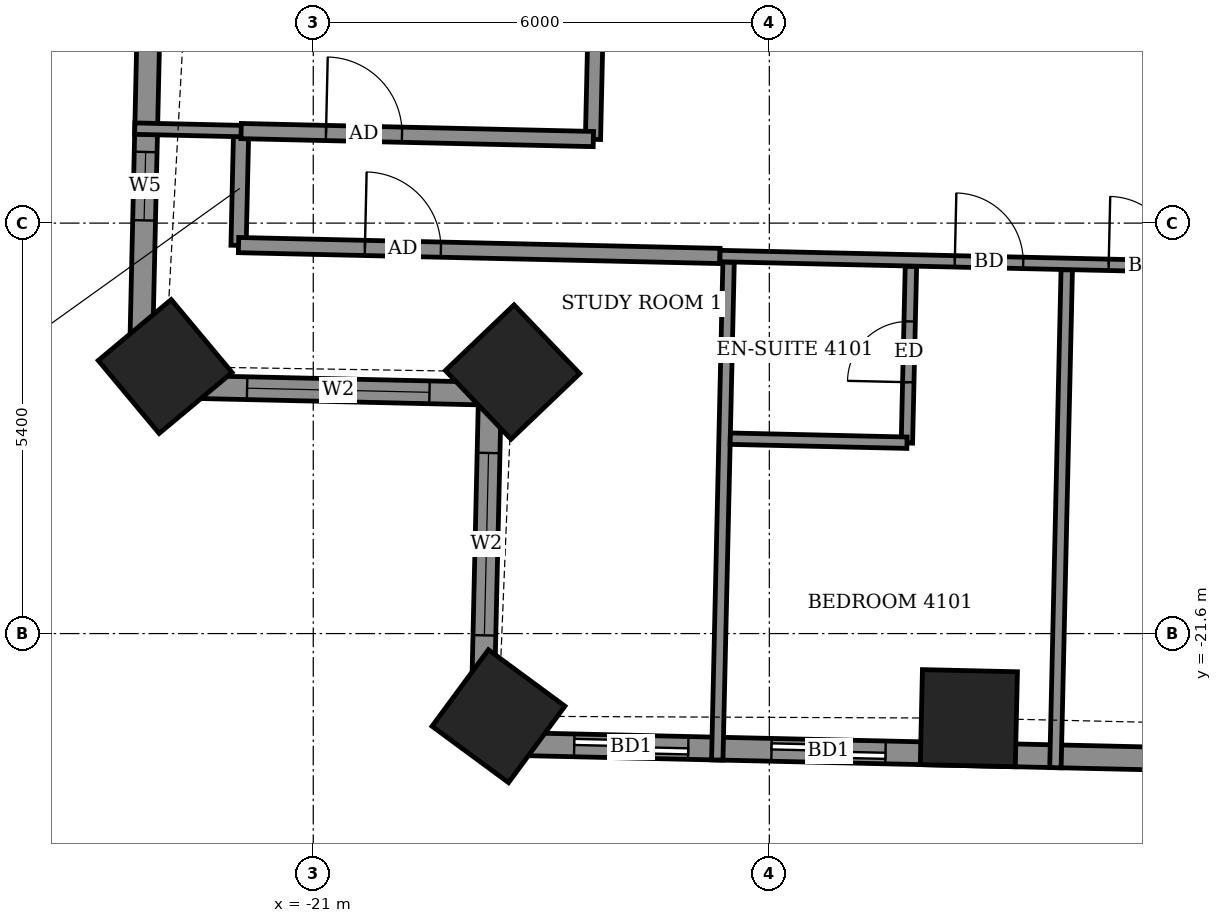
"""IFC4 building model, lengths in metres.
Left out: names, types, materials, properties, quantities, classifications, styles, units other than length and angle.
Written with IfcOpenShell. Run it as: python <this file> out.ifc"""

import sys

from ifc_helpers import new_model, si_unit, direction, frame, frame_2d, origin, origin_2d, place, context, subcontext, project, spatial, rectangle, extrude, element, fill, save


model = new_model("IFC4")
c1 = context("Model", 3, precision=1e-05, world=origin(), true_north=direction((0.0, 1.0)))
c2 = subcontext(c1, "Body", "Model", "MODEL_VIEW")
j1 = project(units=[si_unit("LENGTHUNIT", "METRE"), si_unit("PLANEANGLEUNIT", "RADIAN")], contexts=[c1])
p1 = place(None, origin())
s1 = spatial("IfcSite", under=j1, at=p1, CompositionType="ELEMENT")
p2 = place(p1, origin())
s2 = spatial("IfcBuilding", under=s1, at=p2, CompositionType="ELEMENT")
p3 = place(p2, frame((0.0, 0.0, 163.5)))
s3 = spatial("IfcBuildingStorey", under=s2, at=p3, CompositionType="ELEMENT", Elevation=163.5)
for number, where, z_axis, x_axis in (
    (1, (-22.948, -18.086, -0.55), (0.0, 0.0, 1.0), (0.641, -0.768, 0.0)),
    (2, (-18.378, -18.159, -0.55), (0.0, 0.0, 1.0), (0.691, -0.723, 0.0)),
    (3, (-18.563, -22.687, -0.55), (0.0, 0.0, 1.0), (0.805, -0.593, 0.0)),
    (4, (-12.375, -22.713, -0.55), (0.0, 0.0, 1.0), (1.0, -0.023, 0.0)),
):
    element("IfcColumn", number, at=place(p3, frame(where, z_axis=z_axis, x_axis=x_axis)), inside=s3, PredefinedType="COLUMN", context=c2, shape_type="SweptSolid", body=[
        extrude(rectangle(XDim=1.25, YDim=1.25, at=origin_2d()), origin(), (0.0, 0.0, 1.0), 3.6),
    ])
p4 = place(p3, frame((-23.038, -7.913, 0.0), z_axis=(0.0, 0.0, 1.0), x_axis=(-0.022705985163, -0.999742185885, 0.0)))
e5 = element("IfcWall", 5, at=p4, inside=s3, PredefinedType="SOLIDWALL", context=c2, shape_type="SweptSolid", body=[
    extrude(rectangle(XDim=10.43, YDim=0.3, at=frame_2d((5.215, 0.0))), origin(), (0.0, 0.0, 1.0), 3.05),
])
p5 = place(p4, frame((1.041, 0.0, 0.0)))
e6 = element("IfcOpeningElement", 6, at=p5, cuts=e5, PredefinedType="OPENING", context=c2, shape_type="SweptSolid", body=[
    extrude(rectangle(XDim=1.5, YDim=2.4, at=frame_2d((0.75, 1.2))), frame((0.0, 0.16, 0.0), z_axis=(0.0, -1.0, 0.0), x_axis=(1.0, 0.0, 0.0)), (0.0, 0.0, 1.0), 0.32),
])
p6 = place(p4, frame((3.573, 0.0, 0.9)))
e7 = element("IfcOpeningElement", 7, at=p6, cuts=e5, PredefinedType="OPENING", context=c2, shape_type="SweptSolid", body=[
    extrude(rectangle(XDim=0.9, YDim=1.5, at=frame_2d((0.45, 0.75))), frame((0.0, 0.16, 0.0), z_axis=(0.0, -1.0, 0.0), x_axis=(1.0, 0.0, 0.0)), (0.0, 0.0, 1.0), 0.32),
])
p7 = place(p4, frame((7.353, 0.0, 0.9)))
e8 = element("IfcOpeningElement", 8, at=p7, cuts=e5, PredefinedType="OPENING", context=c2, shape_type="SweptSolid", body=[
    extrude(rectangle(XDim=0.9, YDim=1.5, at=frame_2d((0.45, 0.75))), frame((0.0, 0.16, 0.0), z_axis=(0.0, -1.0, 0.0), x_axis=(1.0, 0.0, 0.0)), (0.0, 0.0, 1.0), 0.32),
])
p8 = place(p3, frame((-23.275, -18.34, 0.0), z_axis=(0.0, 0.0, 1.0), x_axis=(0.999744377441, -0.022609285172, 0.0)))
e9 = element("IfcWall", 9, at=p8, inside=s3, PredefinedType="SOLIDWALL", context=c2, shape_type="SweptSolid", body=[
    extrude(rectangle(XDim=4.6, YDim=0.3, at=frame_2d((2.3, 0.0))), origin(), (0.0, 0.0, 1.0), 2.55),
])
p9 = place(p8, frame((1.405, 0.0, 0.9)))
e10 = element("IfcOpeningElement", 10, at=p9, cuts=e9, PredefinedType="OPENING", context=c2, shape_type="SweptSolid", body=[
    extrude(rectangle(XDim=2.4, YDim=1.5, at=frame_2d((1.2, 0.75))), frame((0.0, 0.16, 0.0), z_axis=(0.0, -1.0, 0.0), x_axis=(1.0, 0.0, 0.0)), (0.0, 0.0, 1.0), 0.32),
])
p10 = place(p3, frame((-18.676, -18.444, 0.0), z_axis=(0.0, 0.0, 1.0), x_axis=(-0.022821468877, -0.999739556364, 0.0)))
e11 = element("IfcWall", 11, at=p10, inside=s3, PredefinedType="SOLIDWALL", context=c2, shape_type="SweptSolid", body=[
    extrude(rectangle(XDim=4.6, YDim=0.3, at=frame_2d((2.3, 0.0))), origin(), (0.0, 0.0, 1.0), 2.55),
])
p11 = place(p10, frame((0.78, 0.0, 0.9)))
e12 = element("IfcOpeningElement", 12, at=p11, cuts=e11, PredefinedType="OPENING", context=c2, shape_type="SweptSolid", body=[
    extrude(rectangle(XDim=2.4, YDim=1.5, at=frame_2d((1.2, 0.75))), frame((0.0, 0.16, 0.0), z_axis=(0.0, -1.0, 0.0), x_axis=(1.0, 0.0, 0.0)), (0.0, 0.0, 1.0), 0.32),
])
p12 = place(p3, frame((-18.781, -23.043, 0.0), z_axis=(0.0, 0.0, 1.0), x_axis=(0.999742794992, -0.022679150367, 0.0)))
e13 = element("IfcWall", 13, at=p12, inside=s3, PredefinedType="SOLIDWALL", context=c2, shape_type="SweptSolid", body=[
    extrude(rectangle(XDim=38.98, YDim=0.3, at=frame_2d((19.49, 0.0))), origin(), (0.0, 0.0, 1.0), 3.05),
])
p13 = place(p12, frame((1.215, 0.0, 0.0)))
e14 = element("IfcOpeningElement", 14, at=p13, cuts=e13, PredefinedType="OPENING", context=c2, shape_type="SweptSolid", body=[
    extrude(rectangle(XDim=1.5, YDim=2.4, at=frame_2d((0.75, 1.2))), frame((0.0, 0.16, 0.0), z_axis=(0.0, -1.0, 0.0), x_axis=(1.0, 0.0, 0.0)), (0.0, 0.0, 1.0), 0.32),
])
p14 = place(p12, frame((3.811, 0.0, 0.0)))
e15 = element("IfcOpeningElement", 15, at=p14, cuts=e13, PredefinedType="OPENING", context=c2, shape_type="SweptSolid", body=[
    extrude(rectangle(XDim=1.5, YDim=2.4, at=frame_2d((0.75, 1.2))), frame((0.0, 0.16, 0.0), z_axis=(0.0, -1.0, 0.0), x_axis=(1.0, 0.0, 0.0)), (0.0, 0.0, 1.0), 0.32),
])
p15 = place(p12, frame((9.0, 0.0, 0.0)))
e16 = element("IfcOpeningElement", 16, at=p15, cuts=e13, PredefinedType="OPENING", context=c2, shape_type="SweptSolid", body=[
    extrude(rectangle(XDim=1.5, YDim=2.4, at=frame_2d((0.75, 1.2))), frame((0.0, 0.16, 0.0), z_axis=(0.0, -1.0, 0.0), x_axis=(1.0, 0.0, 0.0)), (0.0, 0.0, 1.0), 0.32),
])
p16 = place(p12, frame((14.109, 0.0, 0.0)))
e17 = element("IfcOpeningElement", 17, at=p16, cuts=e13, PredefinedType="OPENING", context=c2, shape_type="SweptSolid", body=[
    extrude(rectangle(XDim=1.5, YDim=2.4, at=frame_2d((0.75, 1.2))), frame((0.0, 0.16, 0.0), z_axis=(0.0, -1.0, 0.0), x_axis=(1.0, 0.0, 0.0)), (0.0, 0.0, 1.0), 0.32),
])
p17 = place(p12, frame((17.008, 0.0, 0.0)))
e18 = element("IfcOpeningElement", 18, at=p17, cuts=e13, PredefinedType="OPENING", context=c2, shape_type="SweptSolid", body=[
    extrude(rectangle(XDim=1.5, YDim=2.4, at=frame_2d((0.75, 1.2))), frame((0.0, 0.16, 0.0), z_axis=(0.0, -1.0, 0.0), x_axis=(1.0, 0.0, 0.0)), (0.0, 0.0, 1.0), 0.32),
])
p18 = place(p12, frame((22.225, 0.0, 0.0)))
e19 = element("IfcOpeningElement", 19, at=p18, cuts=e13, PredefinedType="OPENING", context=c2, shape_type="SweptSolid", body=[
    extrude(rectangle(XDim=1.5, YDim=2.4, at=frame_2d((0.75, 1.2))), frame((0.0, 0.16, 0.0), z_axis=(0.0, -1.0, 0.0), x_axis=(1.0, 0.0, 0.0)), (0.0, 0.0, 1.0), 0.32),
])
p19 = place(p12, frame((27.181, 0.0, 0.0)))
e20 = element("IfcOpeningElement", 20, at=p19, cuts=e13, PredefinedType="OPENING", context=c2, shape_type="SweptSolid", body=[
    extrude(rectangle(XDim=1.5, YDim=2.4, at=frame_2d((0.75, 1.2))), frame((0.0, 0.16, 0.0), z_axis=(0.0, -1.0, 0.0), x_axis=(1.0, 0.0, 0.0)), (0.0, 0.0, 1.0), 0.32),
])
p20 = place(p12, frame((30.079, 0.0, 0.0)))
e21 = element("IfcOpeningElement", 21, at=p20, cuts=e13, PredefinedType="OPENING", context=c2, shape_type="SweptSolid", body=[
    extrude(rectangle(XDim=1.5, YDim=2.4, at=frame_2d((0.75, 1.2))), frame((0.0, 0.16, 0.0), z_axis=(0.0, -1.0, 0.0), x_axis=(1.0, 0.0, 0.0)), (0.0, 0.0, 1.0), 0.32),
])
p21 = place(p12, frame((34.751, 0.0, 0.9)))
e22 = element("IfcOpeningElement", 22, at=p21, cuts=e13, PredefinedType="OPENING", context=c2, shape_type="SweptSolid", body=[
    extrude(rectangle(XDim=2.4, YDim=1.5, at=frame_2d((1.2, 0.75))), frame((0.0, 0.16, 0.0), z_axis=(0.0, -1.0, 0.0), x_axis=(1.0, 0.0, 0.0)), (0.0, 0.0, 1.0), 0.32),
])
p22 = place(p3, frame((-15.685, -23.263, 0.0), z_axis=(0.0, 0.0, 1.0), x_axis=(0.022772202332, 0.999740679777, 0.0)))
e23 = element("IfcWall", 23, at=p22, inside=s3, PredefinedType="PARTITIONING", context=c2, shape_type="SweptSolid", body=[
    extrude(rectangle(XDim=6.551, YDim=0.15, at=frame_2d((3.275, 0.0))), origin(), (0.0, 0.0, 1.0), 2.55),
])
p23 = place(p3, frame((-11.236, -23.364, 0.0), z_axis=(0.0, 0.0, 1.0), x_axis=(0.022771353855, 0.999740699103, 0.0)))
e24 = element("IfcWall", 24, at=p23, inside=s3, PredefinedType="PARTITIONING", context=c2, shape_type="SweptSolid", body=[
    extrude(rectangle(XDim=6.551, YDim=0.15, at=frame_2d((3.275, 0.0))), origin(), (0.0, 0.0, 1.0), 2.55),
])
p24 = place(p3, frame((-13.19, -19.093, 0.0), z_axis=(0.0, 0.0, 1.0), x_axis=(0.02279059109, 0.999740260747, 0.0)))
e25 = element("IfcWall", 25, at=p24, inside=s3, PredefinedType="PARTITIONING", context=c2, shape_type="SweptSolid", body=[
    extrude(rectangle(XDim=2.324, YDim=0.15, at=frame_2d((1.162, 0.0))), origin(), (0.0, 0.0, 1.0), 3.05),
])
p25 = place(p24, frame((0.8, 0.0, 0.0)))
e26 = element("IfcOpeningElement", 26, at=p25, cuts=e25, PredefinedType="OPENING", context=c2, shape_type="SweptSolid", body=[
    extrude(rectangle(XDim=0.8, YDim=2.1, at=frame_2d((0.4, 1.05))), frame((0.0, 0.085, 0.0), z_axis=(0.0, -1.0, 0.0), x_axis=(1.0, 0.0, 0.0)), (0.0, 0.0, 1.0), 0.17),
])
p26 = place(p3, frame((-15.514, -19.036, 0.0), z_axis=(0.0, 0.0, 1.0), x_axis=(0.999738082346, -0.022885950011, 0.0)))
e27 = element("IfcWall", 27, at=p26, inside=s3, PredefinedType="PARTITIONING", context=c2, shape_type="SweptSolid", body=[
    extrude(rectangle(XDim=2.325, YDim=0.15, at=frame_2d((1.163, 0.0))), origin(), (0.0, 0.0, 1.0), 3.05),
])
p27 = place(p3, frame((-21.983, -16.493, 0.0), z_axis=(0.0, 0.0, 1.0), x_axis=(0.022617910375, 0.999744182344, 0.0)))
e28 = element("IfcWall", 28, at=p27, inside=s3, PredefinedType="PARTITIONING", context=c2, shape_type="SweptSolid", body=[
    extrude(rectangle(XDim=1.5, YDim=0.2, at=frame_2d((0.75, 0.0))), origin(), (0.0, 0.0, 1.0), 3.05),
])
p28 = place(p3, frame((-21.983, -16.489, 0.0), z_axis=(0.0, 0.0, 1.0), x_axis=(0.999744930163, -0.022584831499, 0.0)))
e29 = element("IfcWall", 29, at=p28, inside=s3, PredefinedType="PARTITIONING", context=c2, shape_type="SweptSolid", body=[
    extrude(rectangle(XDim=6.335, YDim=0.2, at=frame_2d((3.167, 0.0))), origin(), (0.0, 0.0, 1.0), 3.05),
])
p29 = place(p28, frame((1.663, 0.0, 0.0)))
e30 = element("IfcOpeningElement", 30, at=p29, cuts=e29, PredefinedType="OPENING", context=c2, shape_type="SweptSolid", body=[
    extrude(rectangle(XDim=1.0, YDim=2.1, at=frame_2d((0.5, 1.05))), frame((0.0, 0.11, 0.0), z_axis=(0.0, -1.0, 0.0), x_axis=(1.0, 0.0, 0.0)), (0.0, 0.0, 1.0), 0.22),
])
p30 = place(p3, frame((-15.649, -16.633, 0.0), z_axis=(0.0, 0.0, 1.0), x_axis=(0.999743261737, -0.022658565952, 0.0)))
e31 = element("IfcWall", 31, at=p30, inside=s3, PredefinedType="PARTITIONING", context=c2, shape_type="SweptSolid", body=[
    extrude(rectangle(XDim=30.536, YDim=0.15, at=frame_2d((15.268, 0.0))), origin(), (0.0, 0.0, 1.0), 3.05),
])
p31 = place(p30, frame((3.09, 0.0, 0.0)))
e32 = element("IfcOpeningElement", 32, at=p31, cuts=e31, PredefinedType="OPENING", context=c2, shape_type="SweptSolid", body=[
    extrude(rectangle(XDim=0.9, YDim=2.1, at=frame_2d((0.45, 1.05))), frame((0.0, 0.085, 0.0), z_axis=(0.0, -1.0, 0.0), x_axis=(1.0, 0.0, 0.0)), (0.0, 0.0, 1.0), 0.17),
])
p32 = place(p30, frame((5.115, 0.0, 0.0)))
e33 = element("IfcOpeningElement", 33, at=p32, cuts=e31, PredefinedType="OPENING", context=c2, shape_type="SweptSolid", body=[
    extrude(rectangle(XDim=0.9, YDim=2.1, at=frame_2d((0.45, 1.05))), frame((0.0, 0.085, 0.0), z_axis=(0.0, -1.0, 0.0), x_axis=(1.0, 0.0, 0.0)), (0.0, 0.0, 1.0), 0.17),
])
p33 = place(p30, frame((11.94, 0.0, 0.0)))
e34 = element("IfcOpeningElement", 34, at=p33, cuts=e31, PredefinedType="OPENING", context=c2, shape_type="SweptSolid", body=[
    extrude(rectangle(XDim=0.9, YDim=2.1, at=frame_2d((0.45, 1.05))), frame((0.0, 0.085, 0.0), z_axis=(0.0, -1.0, 0.0), x_axis=(1.0, 0.0, 0.0)), (0.0, 0.0, 1.0), 0.17),
])
p34 = place(p30, frame((13.965, 0.0, 0.0)))
e35 = element("IfcOpeningElement", 35, at=p34, cuts=e31, PredefinedType="OPENING", context=c2, shape_type="SweptSolid", body=[
    extrude(rectangle(XDim=0.9, YDim=2.1, at=frame_2d((0.45, 1.05))), frame((0.0, 0.085, 0.0), z_axis=(0.0, -1.0, 0.0), x_axis=(1.0, 0.0, 0.0)), (0.0, 0.0, 1.0), 0.17),
])
p35 = place(p30, frame((20.74, 0.0, 0.0)))
e36 = element("IfcOpeningElement", 36, at=p35, cuts=e31, PredefinedType="OPENING", context=c2, shape_type="SweptSolid", body=[
    extrude(rectangle(XDim=0.9, YDim=2.1, at=frame_2d((0.45, 1.05))), frame((0.0, 0.085, 0.0), z_axis=(0.0, -1.0, 0.0), x_axis=(1.0, 0.0, 0.0)), (0.0, 0.0, 1.0), 0.17),
])
p36 = place(p30, frame((22.665, 0.0, 0.0)))
e37 = element("IfcOpeningElement", 37, at=p36, cuts=e31, PredefinedType="OPENING", context=c2, shape_type="SweptSolid", body=[
    extrude(rectangle(XDim=0.9, YDim=2.1, at=frame_2d((0.45, 1.05))), frame((0.0, 0.085, 0.0), z_axis=(0.0, -1.0, 0.0), x_axis=(1.0, 0.0, 0.0)), (0.0, 0.0, 1.0), 0.17),
])
p37 = place(p30, frame((29.415, 0.0, 0.0)))
e38 = element("IfcOpeningElement", 38, at=p37, cuts=e31, PredefinedType="OPENING", context=c2, shape_type="SweptSolid", body=[
    extrude(rectangle(XDim=0.9, YDim=2.1, at=frame_2d((0.45, 1.05))), frame((0.0, 0.085, 0.0), z_axis=(0.0, -1.0, 0.0), x_axis=(1.0, 0.0, 0.0)), (0.0, 0.0, 1.0), 0.17),
])
p38 = place(p3, frame((-17.32, -15.098, 0.0), z_axis=(0.0, 0.0, 1.0), x_axis=(0.022694293906, 0.999742451346, 0.0)))
e39 = element("IfcWall", 39, at=p38, inside=s3, PredefinedType="PARTITIONING", context=c2, shape_type="SweptSolid", body=[
    extrude(rectangle(XDim=28.024, YDim=0.2, at=frame_2d((14.012, 0.0))), origin(), (0.0, 0.0, 1.0), 3.05),
])
p39 = place(p38, frame((21.174, 0.0, 0.0)))
e40 = element("IfcOpeningElement", 40, at=p39, cuts=e39, PredefinedType="OPENING", context=c2, shape_type="SweptSolid", body=[
    extrude(rectangle(XDim=1.0, YDim=2.1, at=frame_2d((0.5, 1.05))), frame((0.0, 0.11, 0.0), z_axis=(0.0, -1.0, 0.0), x_axis=(1.0, 0.0, 0.0)), (0.0, 0.0, 1.0), 0.22),
])
p40 = place(p38, frame((23.349, 0.0, 0.0)))
e41 = element("IfcOpeningElement", 41, at=p40, cuts=e39, PredefinedType="OPENING", context=c2, shape_type="SweptSolid", body=[
    extrude(rectangle(XDim=0.9, YDim=2.1, at=frame_2d((0.45, 1.05))), frame((0.0, 0.11, 0.0), z_axis=(0.0, -1.0, 0.0), x_axis=(1.0, 0.0, 0.0)), (0.0, 0.0, 1.0), 0.22),
])
p41 = place(p38, frame((16.899, 0.0, 0.0)))
e42 = element("IfcOpeningElement", 42, at=p41, cuts=e39, PredefinedType="OPENING", context=c2, shape_type="SweptSolid", body=[
    extrude(rectangle(XDim=1.0, YDim=2.1, at=frame_2d((0.5, 1.05))), frame((0.0, 0.11, 0.0), z_axis=(0.0, -1.0, 0.0), x_axis=(1.0, 0.0, 0.0)), (0.0, 0.0, 1.0), 0.22),
])
p42 = place(p38, frame((19.099, 0.0, 0.0)))
e43 = element("IfcOpeningElement", 43, at=p42, cuts=e39, PredefinedType="OPENING", context=c2, shape_type="SweptSolid", body=[
    extrude(rectangle(XDim=0.9, YDim=2.1, at=frame_2d((0.45, 1.05))), frame((0.0, 0.11, 0.0), z_axis=(0.0, -1.0, 0.0), x_axis=(1.0, 0.0, 0.0)), (0.0, 0.0, 1.0), 0.22),
])
p43 = place(p38, frame((12.324, 0.0, 0.0)))
e44 = element("IfcOpeningElement", 44, at=p43, cuts=e39, PredefinedType="OPENING", context=c2, shape_type="SweptSolid", body=[
    extrude(rectangle(XDim=1.0, YDim=2.1, at=frame_2d((0.5, 1.05))), frame((0.0, 0.11, 0.0), z_axis=(0.0, -1.0, 0.0), x_axis=(1.0, 0.0, 0.0)), (0.0, 0.0, 1.0), 0.22),
])
p44 = place(p38, frame((14.699, 0.0, 0.0)))
e45 = element("IfcOpeningElement", 45, at=p44, cuts=e39, PredefinedType="OPENING", context=c2, shape_type="SweptSolid", body=[
    extrude(rectangle(XDim=0.9, YDim=2.1, at=frame_2d((0.45, 1.05))), frame((0.0, 0.11, 0.0), z_axis=(0.0, -1.0, 0.0), x_axis=(1.0, 0.0, 0.0)), (0.0, 0.0, 1.0), 0.22),
])
p45 = place(p38, frame((10.099, 0.0, 0.0)))
e46 = element("IfcOpeningElement", 46, at=p45, cuts=e39, PredefinedType="OPENING", context=c2, shape_type="SweptSolid", body=[
    extrude(rectangle(XDim=1.0, YDim=2.1, at=frame_2d((0.5, 1.05))), frame((0.0, 0.11, 0.0), z_axis=(0.0, -1.0, 0.0), x_axis=(1.0, 0.0, 0.0)), (0.0, 0.0, 1.0), 0.22),
])
p46 = place(p38, frame((7.749, 0.0, 0.0)))
e47 = element("IfcOpeningElement", 47, at=p46, cuts=e39, PredefinedType="OPENING", context=c2, shape_type="SweptSolid", body=[
    extrude(rectangle(XDim=0.9, YDim=2.1, at=frame_2d((0.45, 1.05))), frame((0.0, 0.11, 0.0), z_axis=(0.0, -1.0, 0.0), x_axis=(1.0, 0.0, 0.0)), (0.0, 0.0, 1.0), 0.22),
])
p47 = place(p38, frame((4.95, 0.0, 0.0)))
e48 = element("IfcOpeningElement", 48, at=p47, cuts=e39, PredefinedType="OPENING", context=c2, shape_type="SweptSolid", body=[
    extrude(rectangle(XDim=1.0, YDim=2.1, at=frame_2d((0.5, 1.05))), frame((0.0, 0.11, 0.0), z_axis=(0.0, -1.0, 0.0), x_axis=(1.0, 0.0, 0.0)), (0.0, 0.0, 1.0), 0.22),
])
p48 = place(p3, frame((-23.348, -14.957, 0.0), z_axis=(0.0, 0.0, 1.0), x_axis=(0.999740216184, -0.022792545827, 0.0)))
e49 = element("IfcWall", 49, at=p48, inside=s3, PredefinedType="PARTITIONING", context=c2, shape_type="SweptSolid", body=[
    extrude(rectangle(XDim=1.403, YDim=0.15, at=frame_2d((0.702, 0.0))), origin(), (0.0, 0.0, 1.0), 2.55),
])
p49 = place(p3, frame((-21.949, -14.989, 0.0), z_axis=(0.0, 0.0, 1.0), x_axis=(0.999743491588, -0.022648422179, 0.0)))
e50 = element("IfcWall", 50, at=p49, inside=s3, PredefinedType="PARTITIONING", context=c2, shape_type="SweptSolid", body=[
    extrude(rectangle(XDim=4.635, YDim=0.2, at=frame_2d((2.318, 0.0))), origin(), (0.0, 0.0, 1.0), 3.05),
])
p50 = place(p49, frame((1.117, 0.0, 0.0)))
e51 = element("IfcOpeningElement", 51, at=p50, cuts=e50, PredefinedType="OPENING", context=c2, shape_type="SweptSolid", body=[
    extrude(rectangle(XDim=1.0, YDim=2.1, at=frame_2d((0.5, 1.05))), frame((0.0, 0.11, 0.0), z_axis=(0.0, -1.0, 0.0), x_axis=(1.0, 0.0, 0.0)), (0.0, 0.0, 1.0), 0.22),
])
p51 = place(p7, origin())
e52 = element("IfcWindow", 52, at=p51, inside=s3, PartitioningType="SINGLE_PANEL", PredefinedType="WINDOW", context=c2, shape_type="SweptSolid", body=[
    extrude(rectangle(XDim=0.9, YDim=1.5, at=frame_2d((0.45, 0.75))), frame((0.0, 0.03, 0.0), z_axis=(0.0, -1.0, 0.0), x_axis=(1.0, 0.0, 0.0)), (0.0, 0.0, 1.0), 0.06),
])
fill(e8, e52)
p52 = place(p9, origin())
e53 = element("IfcWindow", 53, at=p52, inside=s3, PartitioningType="DOUBLE_PANEL_VERTICAL", PredefinedType="WINDOW", context=c2, shape_type="SweptSolid", body=[
    extrude(rectangle(XDim=2.4, YDim=1.5, at=frame_2d((1.2, 0.75))), frame((0.0, 0.03, 0.0), z_axis=(0.0, -1.0, 0.0), x_axis=(1.0, 0.0, 0.0)), (0.0, 0.0, 1.0), 0.06),
])
fill(e10, e53)
p53 = place(p11, origin())
e54 = element("IfcWindow", 54, at=p53, inside=s3, PartitioningType="DOUBLE_PANEL_VERTICAL", PredefinedType="WINDOW", context=c2, shape_type="SweptSolid", body=[
    extrude(rectangle(XDim=2.4, YDim=1.5, at=frame_2d((1.2, 0.75))), frame((0.0, 0.03, 0.0), z_axis=(0.0, -1.0, 0.0), x_axis=(1.0, 0.0, 0.0)), (0.0, 0.0, 1.0), 0.06),
])
fill(e12, e54)
p54 = place(p13, origin())
e55 = element("IfcDoor", 55, at=p54, inside=s3, OperationType="SLIDING_TO_LEFT", PredefinedType="DOOR", context=c2, shape_type="SweptSolid", body=[
    extrude(rectangle(XDim=1.5, YDim=2.4, at=frame_2d((0.75, 1.2))), frame((0.0, 0.025, 0.0), z_axis=(0.0, -1.0, 0.0), x_axis=(1.0, 0.0, 0.0)), (0.0, 0.0, 1.0), 0.05),
])
fill(e14, e55)
p55 = place(p14, origin())
e56 = element("IfcDoor", 56, at=p55, inside=s3, OperationType="SLIDING_TO_LEFT", PredefinedType="DOOR", context=c2, shape_type="SweptSolid", body=[
    extrude(rectangle(XDim=1.5, YDim=2.4, at=frame_2d((0.75, 1.2))), frame((0.0, 0.025, 0.0), z_axis=(0.0, -1.0, 0.0), x_axis=(1.0, 0.0, 0.0)), (0.0, 0.0, 1.0), 0.05),
])
fill(e15, e56)
p56 = place(p29, origin())
e57 = element("IfcDoor", 57, at=p56, inside=s3, OperationType="SINGLE_SWING_LEFT", PredefinedType="DOOR", context=c2, shape_type="SweptSolid", body=[
    extrude(rectangle(XDim=1.0, YDim=2.1, at=frame_2d((0.5, 1.05))), frame((0.0, 0.025, 0.0), z_axis=(0.0, -1.0, 0.0), x_axis=(1.0, 0.0, 0.0)), (0.0, 0.0, 1.0), 0.05),
])
fill(e30, e57)
p57 = place(p31, origin())
e58 = element("IfcDoor", 58, at=p57, inside=s3, OperationType="SINGLE_SWING_LEFT", PredefinedType="DOOR", context=c2, shape_type="SweptSolid", body=[
    extrude(rectangle(XDim=0.9, YDim=2.1, at=frame_2d((0.45, 1.05))), frame((0.0, 0.025, 0.0), z_axis=(0.0, -1.0, 0.0), x_axis=(1.0, 0.0, 0.0)), (0.0, 0.0, 1.0), 0.05),
])
fill(e32, e58)
p58 = place(p25, origin())
e59 = element("IfcDoor", 59, at=p58, inside=s3, OperationType="SINGLE_SWING_LEFT", PredefinedType="DOOR", context=c2, shape_type="SweptSolid", body=[
    extrude(rectangle(XDim=0.8, YDim=2.1, at=frame_2d((0.4, 1.05))), frame((0.0, 0.025, 0.0), z_axis=(0.0, -1.0, 0.0), x_axis=(1.0, 0.0, 0.0)), (0.0, 0.0, 1.0), 0.05),
])
fill(e26, e59)
p59 = place(p32, origin())
e60 = element("IfcDoor", 60, at=p59, inside=s3, OperationType="SINGLE_SWING_RIGHT", PredefinedType="DOOR", context=c2, shape_type="SweptSolid", body=[
    extrude(rectangle(XDim=0.9, YDim=2.1, at=frame_2d((0.45, 1.05))), frame((0.0, 0.025, 0.0), z_axis=(0.0, -1.0, 0.0), x_axis=(1.0, 0.0, 0.0)), (0.0, 0.0, 1.0), 0.05),
])
fill(e33, e60)
p60 = place(p50, origin())
e61 = element("IfcDoor", 61, at=p60, inside=s3, OperationType="SINGLE_SWING_RIGHT", PredefinedType="DOOR", context=c2, shape_type="SweptSolid", body=[
    extrude(rectangle(XDim=1.0, YDim=2.1, at=frame_2d((0.5, 1.05))), frame((0.0, 0.025, 0.0), z_axis=(0.0, -1.0, 0.0), x_axis=(1.0, 0.0, 0.0)), (0.0, 0.0, 1.0), 0.05),
])
fill(e51, e61)
save(model, sys.argv[1])
